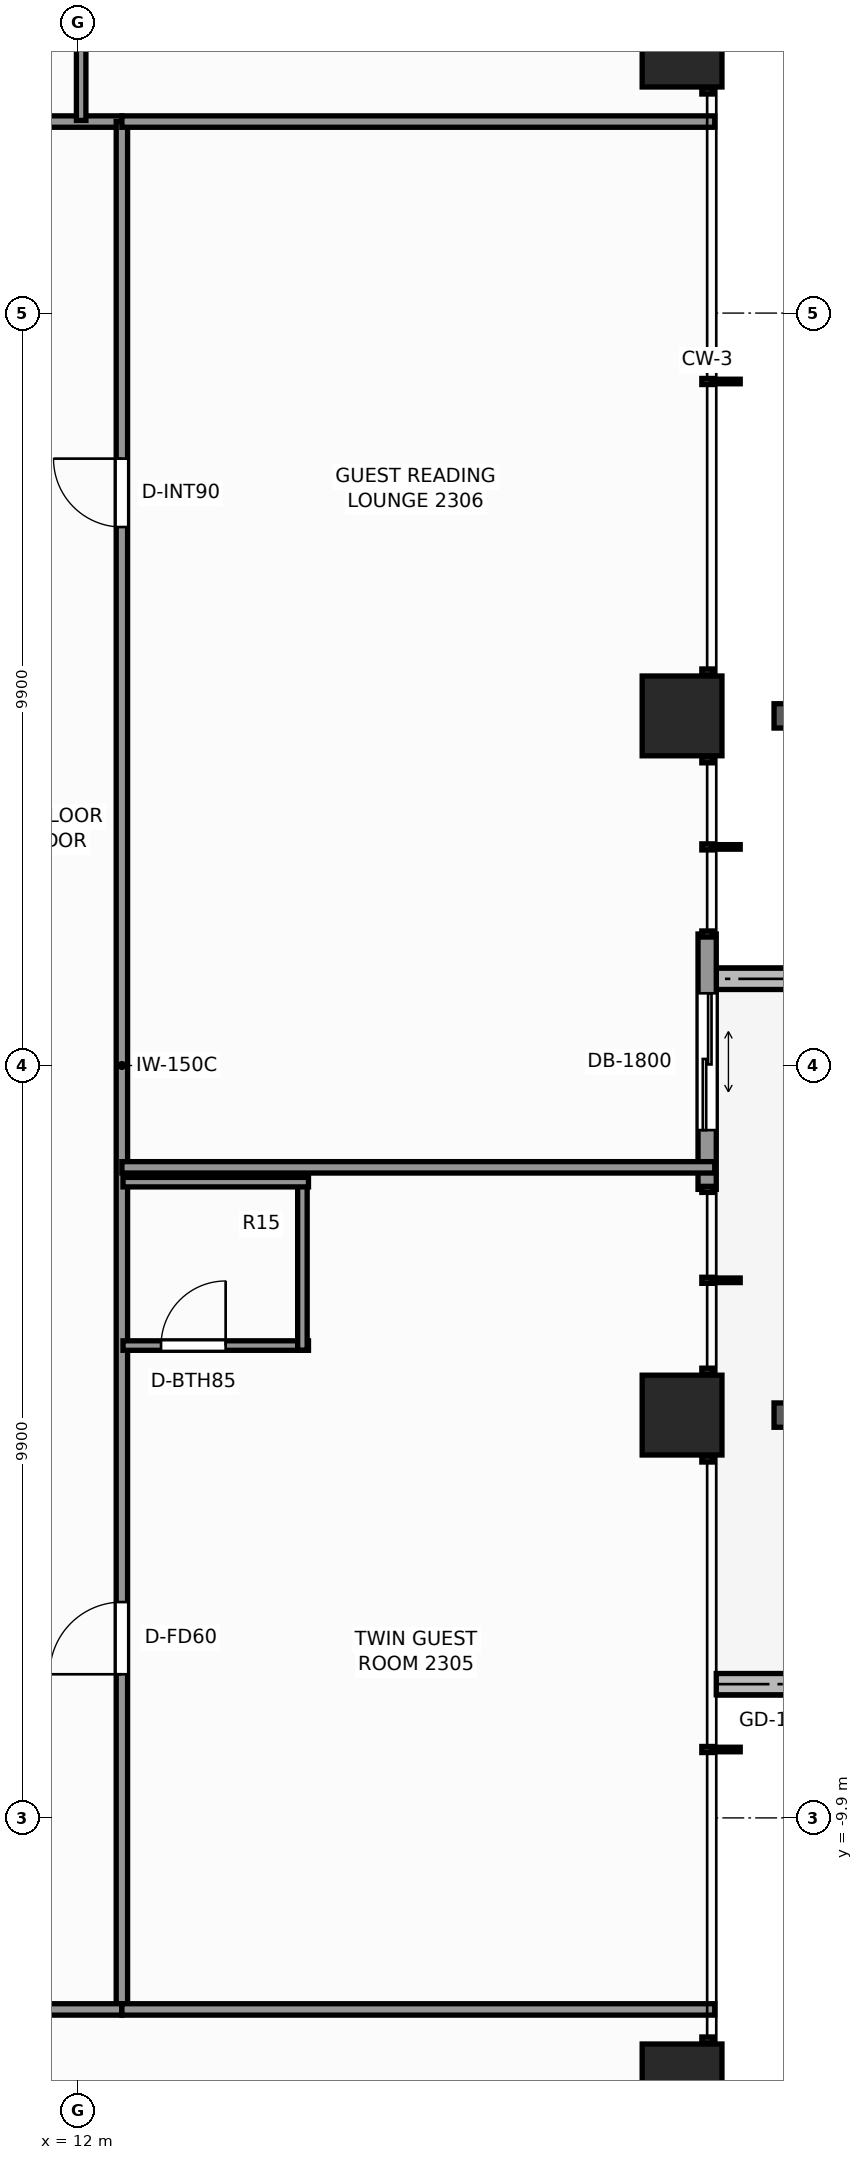
"""IFC4 building model, lengths in metres.
Left out: names, types, materials, properties, quantities, classifications, styles, units other than length and angle.
Written with IfcOpenShell. Run it as: python <this file> out.ifc"""

import sys

from ifc_helpers import new_model, si_unit, direction, frame, frame_2d, origin, origin_2d, place, context, subcontext, project, spatial, rectangle, extrude, element, fill, save


model = new_model("IFC4")
c1 = context("Model", 3, precision=1e-05, world=origin(), true_north=direction((0.0, 1.0)))
c2 = subcontext(c1, "Body", "Model", "MODEL_VIEW")
j1 = project(units=[si_unit("LENGTHUNIT", "METRE"), si_unit("PLANEANGLEUNIT", "RADIAN")], contexts=[c1])
p1 = place(None, origin())
s1 = spatial("IfcSite", under=j1, at=p1, CompositionType="ELEMENT")
p2 = place(p1, origin())
s2 = spatial("IfcBuilding", under=s1, at=p2, CompositionType="ELEMENT")
p3 = place(p2, frame((0.0, 0.0, 82.1)))
s3 = spatial("IfcBuildingStorey", under=s2, at=p3, CompositionType="ELEMENT", Elevation=82.1)
for number, where, z_axis, x_axis in (
    (1, (19.95, -13.4, 0.0), (0.0, 0.0, 1.0), (1.0, 0.0, 0.0)),
    (2, (19.95, -4.6, 0.0), (0.0, 0.0, 1.0), (1.0, 0.0, 0.0)),
    (3, (19.95, 4.6, 0.0), (0.0, 0.0, 1.0), (1.0, 0.0, 0.0)),
    (4, (19.95, 13.4, 0.0), (0.0, 0.0, 1.0), (1.0, 0.0, 0.0)),
):
    element("IfcColumn", number, at=place(p3, frame(where, z_axis=z_axis, x_axis=x_axis)), inside=s3, PredefinedType="COLUMN", context=c2, shape_type="SweptSolid", body=[
        extrude(rectangle(XDim=1.05, YDim=1.05, at=origin_2d()), origin(), (0.0, 0.0, 1.0), 3.3),
    ])
for number, where, z_axis, x_axis in (
    (5, (20.4, -8.14, -0.04), (0.0, 0.0, 1.0), (1.0, 0.0, 0.0)),
    (6, (23.7, 1.14, -0.04), (0.0, 0.0, 1.0), (-1.0, 0.0, 0.0)),
):
    element("IfcWall", number, at=place(p3, frame(where, z_axis=z_axis, x_axis=x_axis)), inside=s3, PredefinedType="PARAPET", context=c2, shape_type="SweptSolid", body=[
        extrude(rectangle(XDim=3.3, YDim=0.28, at=frame_2d((1.65, 0.0))), origin(), (0.0, 0.0, 1.0), 0.42),
    ])
p4 = place(p3, frame((20.28, 1.73, 0.0), z_axis=(0.0, 0.0, 1.0), x_axis=(0.0, -1.0, 0.0)))
e7 = element("IfcWall", 7, at=p4, inside=s3, PredefinedType="STANDARD", context=c2, shape_type="SweptSolid", body=[
    extrude(rectangle(XDim=3.36, YDim=0.24, at=frame_2d((1.68, 0.0))), origin(), (0.0, 0.0, 1.0), 3.08),
])
p5 = place(p4, frame((0.78, 0.0, 0.0)))
e8 = element("IfcOpeningElement", 8, at=p5, cuts=e7, PredefinedType="OPENING", context=c2, shape_type="SweptSolid", body=[
    extrude(rectangle(XDim=1.8, YDim=2.2, at=frame_2d((0.9, 1.1))), frame((0.0, 0.13, 0.0), z_axis=(0.0, -1.0, 0.0), x_axis=(1.0, 0.0, 0.0)), (0.0, 0.0, 1.0), 0.26),
])
p6 = place(p3, frame((-12.58, 12.42, 0.0), z_axis=(0.0, 0.0, 1.0), x_axis=(1.0, 0.0, 0.0)))
e9 = element("IfcWall", 9, at=p6, inside=s3, PredefinedType="PARTITIONING", context=c2, shape_type="SweptSolid", body=[
    extrude(rectangle(XDim=25.16, YDim=0.15, at=frame_2d((12.58, 0.0))), origin(), (0.0, 0.0, 1.0), 2.292),
])
p7 = place(p6, frame((3.395, 0.0, 0.0)))
e10 = element("IfcOpeningElement", 10, at=p7, cuts=e9, PredefinedType="OPENING", context=c2, shape_type="SweptSolid", body=[
    extrude(rectangle(XDim=0.9, YDim=2.06, at=frame_2d((0.45, 1.03))), frame((0.0, 0.085, 0.0), z_axis=(0.0, -1.0, 0.0), x_axis=(1.0, 0.0, 0.0)), (0.0, 0.0, 1.0), 0.17),
])
p8 = place(p6, frame((5.73, 0.0, 0.0)))
e11 = element("IfcOpeningElement", 11, at=p8, cuts=e9, PredefinedType="OPENING", context=c2, shape_type="SweptSolid", body=[
    extrude(rectangle(XDim=0.9, YDim=2.06, at=frame_2d((0.45, 1.03))), frame((0.0, 0.085, 0.0), z_axis=(0.0, -1.0, 0.0), x_axis=(1.0, 0.0, 0.0)), (0.0, 0.0, 1.0), 0.17),
])
p9 = place(p6, frame((9.208, 0.0, 0.0)))
e12 = element("IfcOpeningElement", 12, at=p9, cuts=e9, PredefinedType="OPENING", context=c2, shape_type="SweptSolid", body=[
    extrude(rectangle(XDim=0.9, YDim=2.06, at=frame_2d((0.45, 1.03))), frame((0.0, 0.085, 0.0), z_axis=(0.0, -1.0, 0.0), x_axis=(1.0, 0.0, 0.0)), (0.0, 0.0, 1.0), 0.17),
])
p10 = place(p6, frame((11.208, 0.0, 0.0)))
e13 = element("IfcOpeningElement", 13, at=p10, cuts=e9, PredefinedType="OPENING", context=c2, shape_type="SweptSolid", body=[
    extrude(rectangle(XDim=0.95, YDim=2.06, at=frame_2d((0.475, 1.03))), frame((0.0, 0.085, 0.0), z_axis=(0.0, -1.0, 0.0), x_axis=(1.0, 0.0, 0.0)), (0.0, 0.0, 1.0), 0.17),
])
p11 = place(p6, frame((18.53, 0.0, 0.0)))
e14 = element("IfcOpeningElement", 14, at=p11, cuts=e9, PredefinedType="OPENING", context=c2, shape_type="SweptSolid", body=[
    extrude(rectangle(XDim=0.9, YDim=2.06, at=frame_2d((0.45, 1.03))), frame((0.0, 0.085, 0.0), z_axis=(0.0, -1.0, 0.0), x_axis=(1.0, 0.0, 0.0)), (0.0, 0.0, 1.0), 0.17),
])
p12 = place(p6, frame((20.777, 0.0, 0.0)))
e15 = element("IfcOpeningElement", 15, at=p12, cuts=e9, PredefinedType="OPENING", context=c2, shape_type="SweptSolid", body=[
    extrude(rectangle(XDim=0.95, YDim=2.06, at=frame_2d((0.475, 1.03))), frame((0.0, 0.085, 0.0), z_axis=(0.0, -1.0, 0.0), x_axis=(1.0, 0.0, 0.0)), (0.0, 0.0, 1.0), 0.17),
])
p13 = place(p3, frame((12.58, -12.42, 0.0), z_axis=(0.0, 0.0, 1.0), x_axis=(0.0, 1.0, 0.0)))
e16 = element("IfcWall", 16, at=p13, inside=s3, PredefinedType="PARTITIONING", context=c2, shape_type="SweptSolid", body=[
    extrude(rectangle(XDim=24.84, YDim=0.15, at=frame_2d((12.42, 0.0))), origin(), (0.0, 0.0, 1.0), 2.292),
])
p14 = place(p13, frame((4.41, 0.0, 0.0)))
e17 = element("IfcOpeningElement", 17, at=p14, cuts=e16, PredefinedType="OPENING", context=c2, shape_type="SweptSolid", body=[
    extrude(rectangle(XDim=0.95, YDim=2.06, at=frame_2d((0.475, 1.03))), frame((0.0, 0.085, 0.0), z_axis=(0.0, -1.0, 0.0), x_axis=(1.0, 0.0, 0.0)), (0.0, 0.0, 1.0), 0.17),
])
p15 = place(p13, frame((19.505, 0.0, 0.0)))
e18 = element("IfcOpeningElement", 18, at=p15, cuts=e16, PredefinedType="OPENING", context=c2, shape_type="SweptSolid", body=[
    extrude(rectangle(XDim=0.9, YDim=2.06, at=frame_2d((0.45, 1.03))), frame((0.0, 0.085, 0.0), z_axis=(0.0, -1.0, 0.0), x_axis=(1.0, 0.0, 0.0)), (0.0, 0.0, 1.0), 0.17),
])
p16 = place(p3, frame((-3.65, -12.42, 0.0), z_axis=(0.0, 0.0, 1.0), x_axis=(1.0, 0.0, 0.0)))
e19 = element("IfcWall", 19, at=p16, inside=s3, PredefinedType="PARTITIONING", context=c2, shape_type="SweptSolid", body=[
    extrude(rectangle(XDim=16.23, YDim=0.15, at=frame_2d((8.115, 0.0))), origin(), (0.0, 0.0, 1.0), 2.292),
])
p17 = place(p16, frame((1.405, 0.0, 0.0)))
e20 = element("IfcOpeningElement", 20, at=p17, cuts=e19, PredefinedType="OPENING", context=c2, shape_type="SweptSolid", body=[
    extrude(rectangle(XDim=0.95, YDim=2.06, at=frame_2d((0.475, 1.03))), frame((0.0, 0.085, 0.0), z_axis=(0.0, -1.0, 0.0), x_axis=(1.0, 0.0, 0.0)), (0.0, 0.0, 1.0), 0.17),
])
p18 = place(p16, frame((10.735, 0.0, 0.0)))
e21 = element("IfcOpeningElement", 21, at=p18, cuts=e19, PredefinedType="OPENING", context=c2, shape_type="SweptSolid", body=[
    extrude(rectangle(XDim=0.9, YDim=2.06, at=frame_2d((0.45, 1.03))), frame((0.0, 0.085, 0.0), z_axis=(0.0, -1.0, 0.0), x_axis=(1.0, 0.0, 0.0)), (0.0, 0.0, 1.0), 0.17),
])
for number, where, z_axis, x_axis in (
    (22, (12.58, -12.42, 0.0), (0.0, 0.0, 1.0), (1.0, 0.0, 0.0)),
    (23, (12.58, 12.42, 0.0), (0.0, 0.0, 1.0), (1.0, 0.0, 0.0)),
):
    element("IfcWall", number, at=place(p3, frame(where, z_axis=z_axis, x_axis=x_axis)), inside=s3, PredefinedType="PARTITIONING", context=c2, shape_type="SweptSolid", body=[
        extrude(rectangle(XDim=7.8, YDim=0.15, at=frame_2d((3.9, 0.0))), origin(), (0.0, 0.0, 1.0), 2.292),
    ])
p19 = place(p3, frame((12.044, 12.435, 0.0), z_axis=(0.0, 0.0, 1.0), x_axis=(0.0, 1.0, 0.0)))
e24 = element("IfcWall", 24, at=p19, inside=s3, PredefinedType="PARTITIONING", context=c2, shape_type="SweptSolid", body=[
    extrude(rectangle(XDim=2.44, YDim=0.125, at=frame_2d((1.22, 0.0))), origin(), (0.0, 0.0, 1.0), 3.08),
])
p20 = place(p3, frame((12.58, -1.34, 0.0), z_axis=(0.0, 0.0, 1.0), x_axis=(1.0, 0.0, 0.0)))
e25 = element("IfcWall", 25, at=p20, inside=s3, PredefinedType="PARTITIONING", context=c2, shape_type="SweptSolid", body=[
    extrude(rectangle(XDim=7.8, YDim=0.15, at=frame_2d((3.9, 0.0))), origin(), (0.0, 0.0, 1.0), 2.449),
])
p21 = place(p3, frame((12.595, -3.685, 0.0), z_axis=(0.0, 0.0, 1.0), x_axis=(1.0, 0.0, 0.0)))
e26 = element("IfcWall", 26, at=p21, inside=s3, PredefinedType="PARTITIONING", context=c2, shape_type="SweptSolid", body=[
    extrude(rectangle(XDim=2.44, YDim=0.125, at=frame_2d((1.22, 0.0))), origin(), (0.0, 0.0, 1.0), 3.08),
])
p22 = place(p21, frame((0.5, 0.0, 0.0)))
e27 = element("IfcOpeningElement", 27, at=p22, cuts=e26, PredefinedType="OPENING", context=c2, shape_type="SweptSolid", body=[
    extrude(rectangle(XDim=0.85, YDim=2.03, at=frame_2d((0.425, 1.015))), frame((0.0, 0.073, 0.0), z_axis=(0.0, -1.0, 0.0), x_axis=(1.0, 0.0, 0.0)), (0.0, 0.0, 1.0), 0.145),
])
p23 = place(p3, frame((14.955, -3.745, 0.0), z_axis=(0.0, 0.0, 1.0), x_axis=(0.0, 1.0, 0.0)))
e28 = element("IfcWall", 28, at=p23, inside=s3, PredefinedType="PARTITIONING", context=c2, shape_type="SweptSolid", body=[
    extrude(rectangle(XDim=2.27, YDim=0.125, at=frame_2d((1.135, 0.0))), origin(), (0.0, 0.0, 1.0), 3.08),
])
p24 = place(p3, frame((12.595, -1.535, 0.0), z_axis=(0.0, 0.0, 1.0), x_axis=(1.0, 0.0, 0.0)))
e29 = element("IfcWall", 29, at=p24, inside=s3, PredefinedType="PARTITIONING", context=c2, shape_type="SweptSolid", body=[
    extrude(rectangle(XDim=2.44, YDim=0.125, at=frame_2d((1.22, 0.0))), origin(), (0.0, 0.0, 1.0), 3.08),
])
p25 = place(p5, origin())
e30 = element("IfcDoor", 30, at=p25, inside=s3, OperationType="DOUBLE_DOOR_SLIDING", PredefinedType="DOOR", context=c2, shape_type="SweptSolid", body=[
    extrude(rectangle(XDim=1.8, YDim=2.2, at=frame_2d((0.9, 1.1))), frame((0.0, 0.025, 0.0), z_axis=(0.0, -1.0, 0.0), x_axis=(1.0, 0.0, 0.0)), (0.0, 0.0, 1.0), 0.05),
])
fill(e8, e30)
p26 = place(p22, origin())
e31 = element("IfcDoor", 31, at=p26, inside=s3, OperationType="SINGLE_SWING_RIGHT", PredefinedType="DOOR", context=c2, shape_type="SweptSolid", body=[
    extrude(rectangle(XDim=0.85, YDim=2.03, at=frame_2d((0.425, 1.015))), frame((0.0, 0.025, 0.0), z_axis=(0.0, -1.0, 0.0), x_axis=(1.0, 0.0, 0.0)), (0.0, 0.0, 1.0), 0.05),
])
fill(e27, e31)
p27 = place(p14, origin())
e32 = element("IfcDoor", 32, at=p27, inside=s3, OperationType="SINGLE_SWING_LEFT", PredefinedType="DOOR", context=c2, shape_type="SweptSolid", body=[
    extrude(rectangle(XDim=0.95, YDim=2.06, at=frame_2d((0.475, 1.03))), frame((0.0, 0.025, 0.0), z_axis=(0.0, -1.0, 0.0), x_axis=(1.0, 0.0, 0.0)), (0.0, 0.0, 1.0), 0.05),
])
fill(e17, e32)
p28 = place(p15, origin())
e33 = element("IfcDoor", 33, at=p28, inside=s3, OperationType="SINGLE_SWING_RIGHT", PredefinedType="DOOR", context=c2, shape_type="SweptSolid", body=[
    extrude(rectangle(XDim=0.9, YDim=2.06, at=frame_2d((0.45, 1.03))), frame((0.0, 0.025, 0.0), z_axis=(0.0, -1.0, 0.0), x_axis=(1.0, 0.0, 0.0)), (0.0, 0.0, 1.0), 0.05),
])
fill(e18, e33)
save(model, sys.argv[1])
